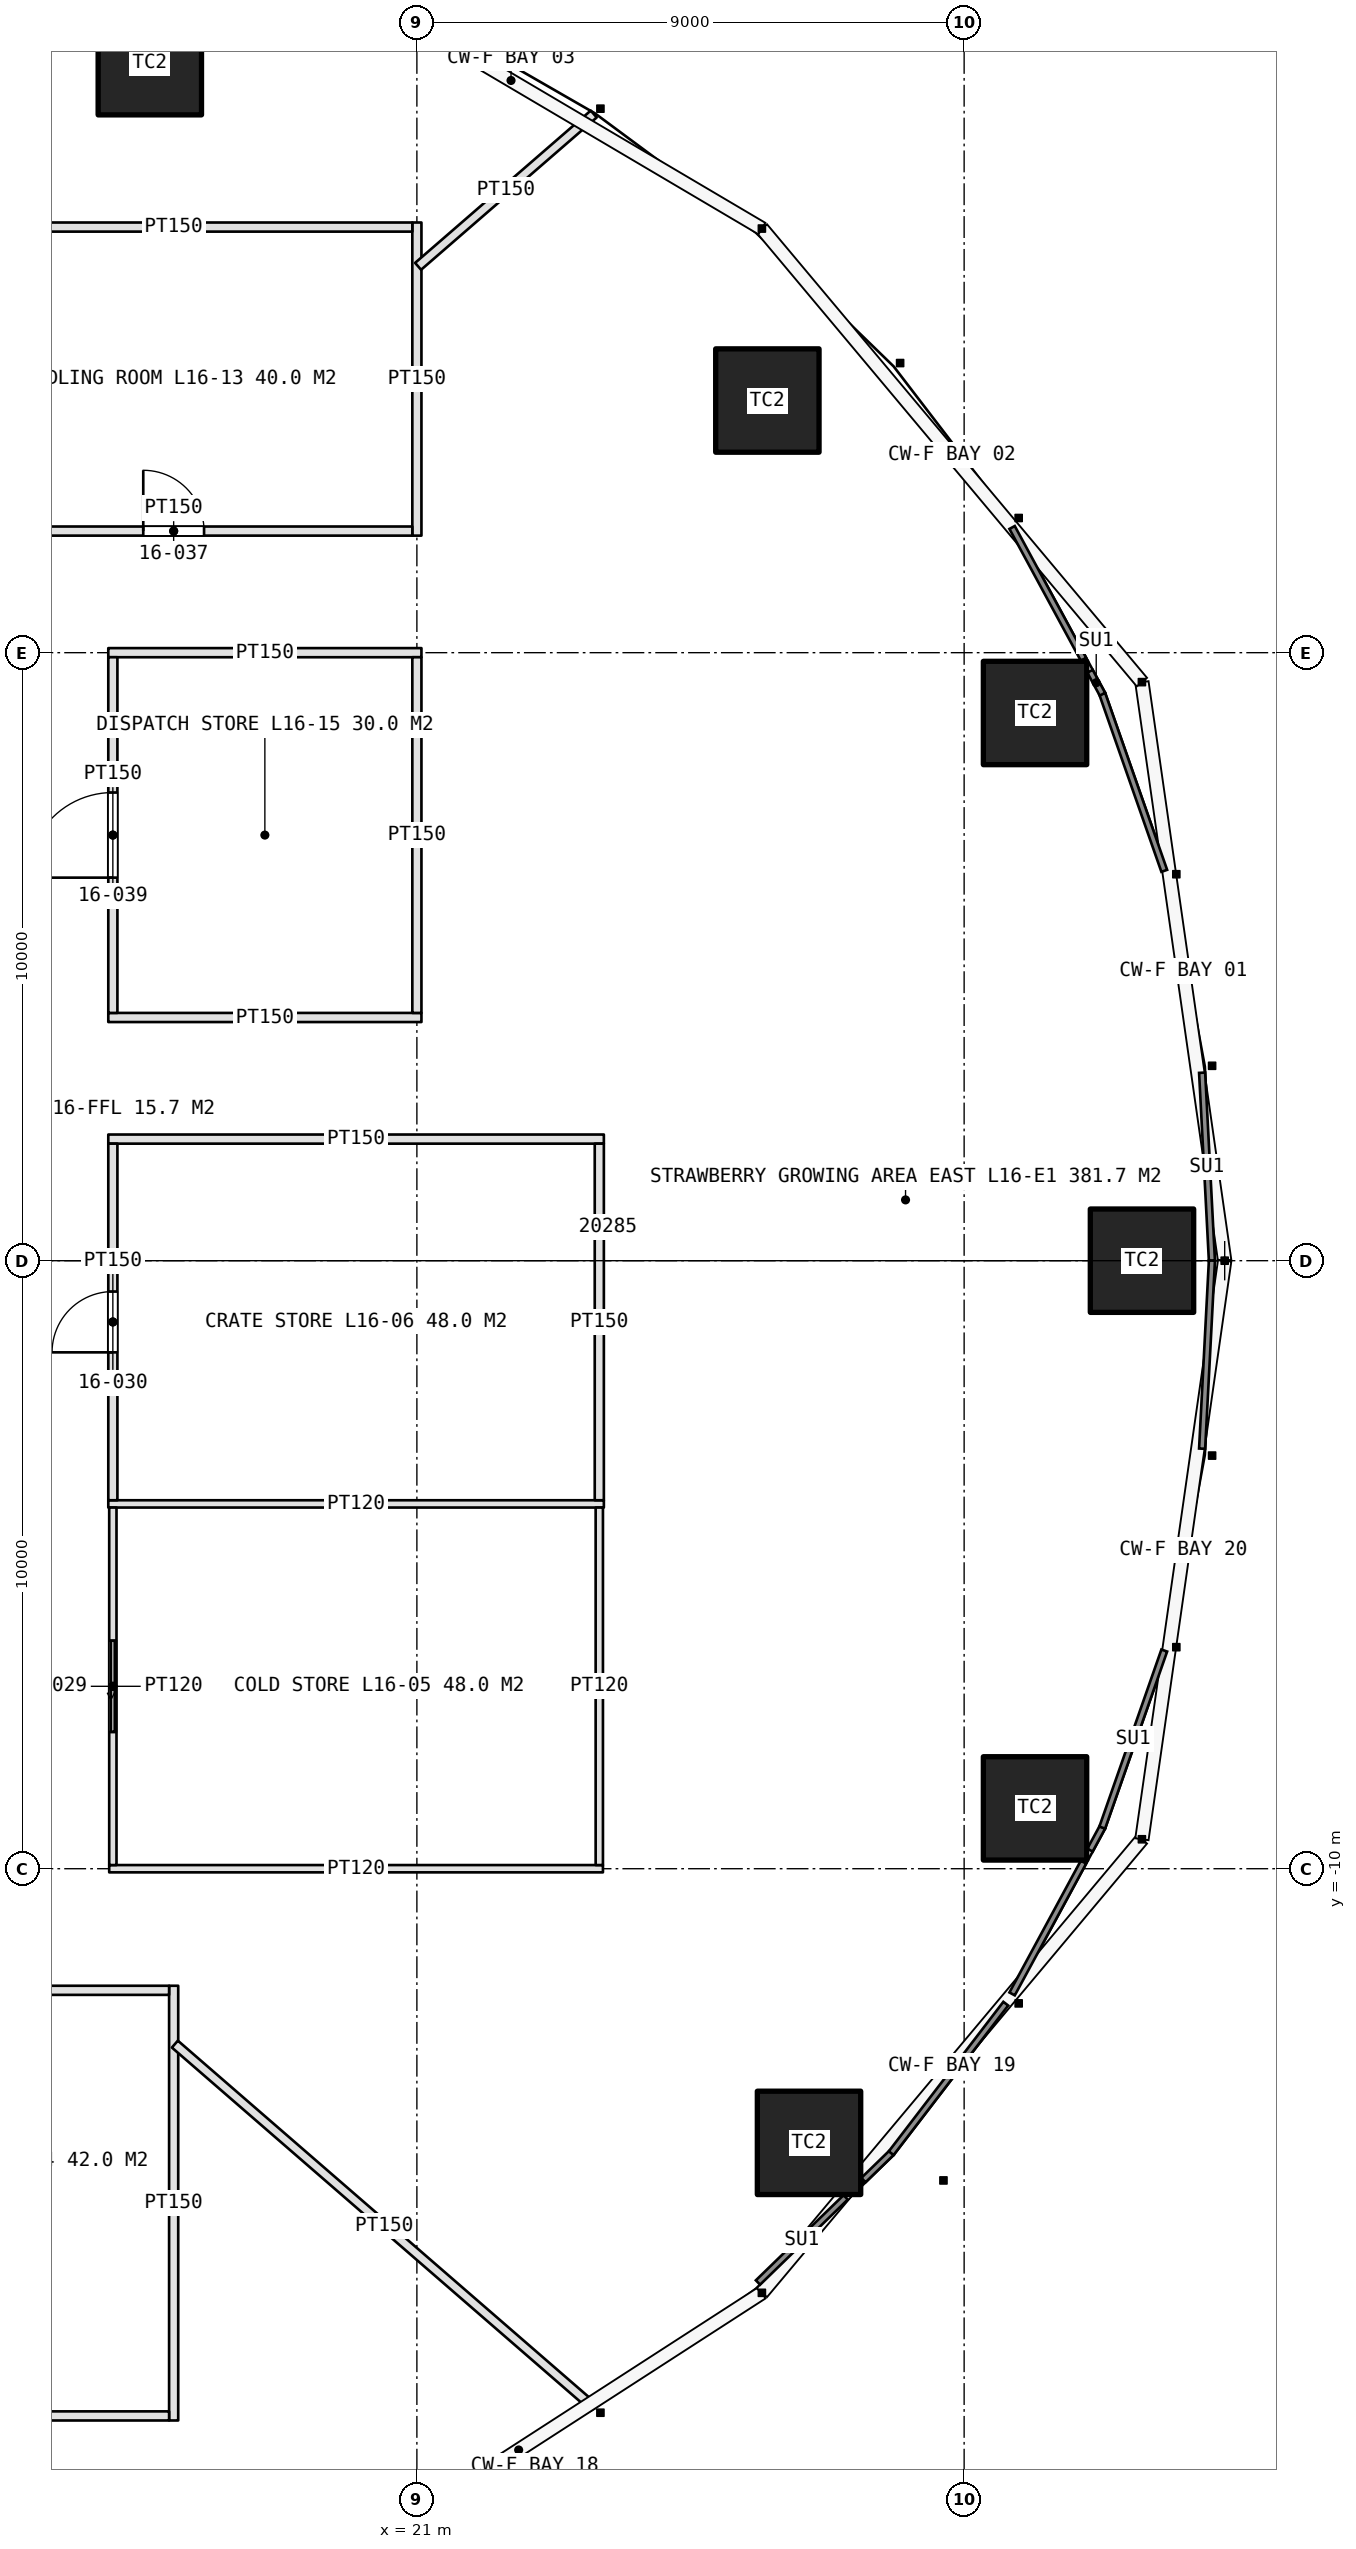
"""IFC4 building model, lengths in metres.
Left out: names, types, materials, properties, quantities, classifications, styles, units other than length and angle.
Written with IfcOpenShell. Run it as: python <this file> out.ifc"""

import sys

from ifc_helpers import new_model, si_unit, direction, frame, frame_2d, origin, origin_2d, place, context, subcontext, project, spatial, rectangle, extrude, element, fill, save


model = new_model("IFC4")
c1 = context("Model", 3, precision=1e-05, world=origin(), true_north=direction((0.0, 1.0)))
c2 = subcontext(c1, "Body", "Model", "MODEL_VIEW")
j1 = project(units=[si_unit("LENGTHUNIT", "METRE"), si_unit("PLANEANGLEUNIT", "RADIAN")], contexts=[c1])
p1 = place(None, origin())
s1 = spatial("IfcSite", under=j1, at=p1, CompositionType="ELEMENT")
p2 = place(p1, origin())
s2 = spatial("IfcBuilding", under=s1, at=p2, CompositionType="ELEMENT")
p3 = place(p2, frame((0.0, 0.0, 80.0)))
s3 = spatial("IfcBuildingStorey", under=s2, at=p3, CompositionType="ELEMENT", Elevation=80.0)
for number, where, z_axis, x_axis in (
    (1, (32.925, 0.0, 0.0), (0.0, 0.0, 1.0), (1.0, 0.0, 0.0)),
    (2, (31.166, 9.008, 0.0), (0.0, 0.0, 1.0), (1.0, 0.0, 0.0)),
    (3, (26.764, 14.147, 0.0), (0.0, 0.0, 1.0), (1.0, 0.0, 0.0)),
    (4, (16.608, 19.695, 0.0), (0.0, 0.0, 1.0), (1.0, 0.0, 0.0)),
    (5, (27.449, -14.509, 0.0), (0.0, 0.0, 1.0), (1.0, 0.0, 0.0)),
    (6, (31.166, -9.008, 0.0), (0.0, 0.0, 1.0), (1.0, 0.0, 0.0)),
):
    element("IfcColumn", number, at=place(p3, frame(where, z_axis=z_axis, x_axis=x_axis)), inside=s3, PredefinedType="COLUMN", context=c2, shape_type="SweptSolid", body=[
        extrude(rectangle(XDim=1.7, YDim=1.7, at=origin_2d()), origin(), (0.0, 0.0, 1.0), 5.0),
    ])
p4 = place(p3, frame((17.0, -11.925, 0.0), z_axis=(0.0, 0.0, 1.0), x_axis=(0.0, -1.0, 0.0)))
e7 = element("IfcWall", 7, at=p4, inside=s3, PredefinedType="PARTITIONING", context=c2, shape_type="SweptSolid", body=[
    extrude(rectangle(XDim=7.15, YDim=0.15, at=frame_2d((3.575, 0.0))), origin(), (0.0, 0.0, 1.0), 3.6),
])
p5 = place(p3, frame((11.075, -12.0, 0.0), z_axis=(0.0, 0.0, 1.0), x_axis=(1.0, 0.0, 0.0)))
e8 = element("IfcWall", 8, at=p5, inside=s3, PredefinedType="PARTITIONING", context=c2, shape_type="SweptSolid", body=[
    extrude(rectangle(XDim=5.85, YDim=0.15, at=frame_2d((2.925, 0.0))), origin(), (0.0, 0.0, 1.0), 3.6),
])
p6 = place(p5, frame((2.225, 0.0, 0.0)))
e9 = element("IfcOpeningElement", 9, at=p6, cuts=e8, PredefinedType="OPENING", context=c2, shape_type="SweptSolid", body=[
    extrude(rectangle(XDim=1.4, YDim=2.4, at=frame_2d((0.7, 1.2))), frame((0.0, 0.085, 0.0), z_axis=(0.0, -1.0, 0.0), x_axis=(1.0, 0.0, 0.0)), (0.0, 0.0, 1.0), 0.17),
])
p7 = place(p3, frame((11.075, -19.0, 0.0), z_axis=(0.0, 0.0, 1.0), x_axis=(1.0, 0.0, 0.0)))
e10 = element("IfcWall", 10, at=p7, inside=s3, PredefinedType="PARTITIONING", context=c2, shape_type="SweptSolid", body=[
    extrude(rectangle(XDim=5.85, YDim=0.15, at=frame_2d((2.925, 0.0))), origin(), (0.0, 0.0, 1.0), 3.6),
])
p8 = place(p3, frame((15.94, -10.0, 0.0), z_axis=(0.0, 0.0, 1.0), x_axis=(1.0, 0.0, 0.0)))
e11 = element("IfcWall", 11, at=p8, inside=s3, PredefinedType="PARTITIONING", context=c2, shape_type="SweptSolid", body=[
    extrude(rectangle(XDim=8.12, YDim=0.12, at=frame_2d((4.06, 0.0))), origin(), (0.0, 0.0, 1.0), 3.6),
])
p9 = place(p3, frame((15.925, -4.0, 0.0), z_axis=(0.0, 0.0, 1.0), x_axis=(1.0, 0.0, 0.0)))
e12 = element("IfcWall", 12, at=p9, inside=s3, PredefinedType="PARTITIONING", context=c2, shape_type="SweptSolid", body=[
    extrude(rectangle(XDim=8.15, YDim=0.12, at=frame_2d((4.075, 0.0))), origin(), (0.0, 0.0, 1.0), 3.6),
])
p10 = place(p3, frame((15.925, 2.0, 0.0), z_axis=(0.0, 0.0, 1.0), x_axis=(1.0, 0.0, 0.0)))
e13 = element("IfcWall", 13, at=p10, inside=s3, PredefinedType="PARTITIONING", context=c2, shape_type="SweptSolid", body=[
    extrude(rectangle(XDim=8.15, YDim=0.15, at=frame_2d((4.075, 0.0))), origin(), (0.0, 0.0, 1.0), 3.6),
])
p11 = place(p3, frame((16.0, -9.94, 0.0), z_axis=(0.0, 0.0, 1.0), x_axis=(0.0, 1.0, 0.0)))
e14 = element("IfcWall", 14, at=p11, inside=s3, PredefinedType="PARTITIONING", context=c2, shape_type="SweptSolid", body=[
    extrude(rectangle(XDim=5.88, YDim=0.12, at=frame_2d((2.94, 0.0))), origin(), (0.0, 0.0, 1.0), 3.6),
])
p12 = place(p11, frame((2.19, 0.0, 0.0)))
e15 = element("IfcOpeningElement", 15, at=p12, cuts=e14, PredefinedType="OPENING", context=c2, shape_type="SweptSolid", body=[
    extrude(rectangle(XDim=1.5, YDim=2.5, at=frame_2d((0.75, 1.25))), frame((0.0, 0.07, 0.0), z_axis=(0.0, -1.0, 0.0), x_axis=(1.0, 0.0, 0.0)), (0.0, 0.0, 1.0), 0.14),
])
p13 = place(p3, frame((24.0, -9.94, 0.0), z_axis=(0.0, 0.0, 1.0), x_axis=(0.0, 1.0, 0.0)))
e16 = element("IfcWall", 16, at=p13, inside=s3, PredefinedType="PARTITIONING", context=c2, shape_type="SweptSolid", body=[
    extrude(rectangle(XDim=5.88, YDim=0.12, at=frame_2d((2.94, 0.0))), origin(), (0.0, 0.0, 1.0), 3.6),
])
p14 = place(p3, frame((16.0, -3.94, 0.0), z_axis=(0.0, 0.0, 1.0), x_axis=(0.0, 1.0, 0.0)))
e17 = element("IfcWall", 17, at=p14, inside=s3, PredefinedType="PARTITIONING", context=c2, shape_type="SweptSolid", body=[
    extrude(rectangle(XDim=5.865, YDim=0.15, at=frame_2d((2.933, 0.0))), origin(), (0.0, 0.0, 1.0), 3.6),
])
p15 = place(p14, frame((2.433, 0.0, 0.0)))
e18 = element("IfcOpeningElement", 18, at=p15, cuts=e17, PredefinedType="OPENING", context=c2, shape_type="SweptSolid", body=[
    extrude(rectangle(XDim=1.0, YDim=2.2, at=frame_2d((0.5, 1.1))), frame((0.0, 0.085, 0.0), z_axis=(0.0, -1.0, 0.0), x_axis=(1.0, 0.0, 0.0)), (0.0, 0.0, 1.0), 0.17),
])
p16 = place(p3, frame((24.0, -3.94, 0.0), z_axis=(0.0, 0.0, 1.0), x_axis=(0.0, 1.0, 0.0)))
e19 = element("IfcWall", 19, at=p16, inside=s3, PredefinedType="PARTITIONING", context=c2, shape_type="SweptSolid", body=[
    extrude(rectangle(XDim=5.865, YDim=0.15, at=frame_2d((2.933, 0.0))), origin(), (0.0, 0.0, 1.0), 3.6),
])
p17 = place(p3, frame((21.0, 11.925, 0.0), z_axis=(0.0, 0.0, 1.0), x_axis=(0.0, 1.0, 0.0)))
e20 = element("IfcWall", 20, at=p17, inside=s3, PredefinedType="PARTITIONING", context=c2, shape_type="SweptSolid", body=[
    extrude(rectangle(XDim=5.15, YDim=0.15, at=frame_2d((2.575, 0.0))), origin(), (0.0, 0.0, 1.0), 3.6),
])
p18 = place(p3, frame((13.075, 12.0, 0.0), z_axis=(0.0, 0.0, 1.0), x_axis=(1.0, 0.0, 0.0)))
e21 = element("IfcWall", 21, at=p18, inside=s3, PredefinedType="PARTITIONING", context=c2, shape_type="SweptSolid", body=[
    extrude(rectangle(XDim=7.85, YDim=0.15, at=frame_2d((3.925, 0.0))), origin(), (0.0, 0.0, 1.0), 3.6),
])
p19 = place(p18, frame((3.425, 0.0, 0.0)))
e22 = element("IfcOpeningElement", 22, at=p19, cuts=e21, PredefinedType="OPENING", context=c2, shape_type="SweptSolid", body=[
    extrude(rectangle(XDim=1.0, YDim=2.2, at=frame_2d((0.5, 1.1))), frame((0.0, 0.085, 0.0), z_axis=(0.0, -1.0, 0.0), x_axis=(1.0, 0.0, 0.0)), (0.0, 0.0, 1.0), 0.17),
])
p20 = place(p3, frame((13.075, 17.0, 0.0), z_axis=(0.0, 0.0, 1.0), x_axis=(1.0, 0.0, 0.0)))
e23 = element("IfcWall", 23, at=p20, inside=s3, PredefinedType="PARTITIONING", context=c2, shape_type="SweptSolid", body=[
    extrude(rectangle(XDim=7.85, YDim=0.15, at=frame_2d((3.925, 0.0))), origin(), (0.0, 0.0, 1.0), 3.6),
])
for number, where, z_axis, x_axis in (
    (24, (15.925, 4.0, 0.0), (0.0, 0.0, 1.0), (1.0, 0.0, 0.0)),
    (25, (15.925, 10.0, 0.0), (0.0, 0.0, 1.0), (1.0, 0.0, 0.0)),
):
    element("IfcWall", number, at=place(p3, frame(where, z_axis=z_axis, x_axis=x_axis)), inside=s3, PredefinedType="PARTITIONING", context=c2, shape_type="SweptSolid", body=[
        extrude(rectangle(XDim=5.15, YDim=0.15, at=frame_2d((2.575, 0.0))), origin(), (0.0, 0.0, 1.0), 3.6),
    ])
p21 = place(p3, frame((16.0, 4.075, 0.0), z_axis=(0.0, 0.0, 1.0), x_axis=(0.0, 1.0, 0.0)))
e26 = element("IfcWall", 26, at=p21, inside=s3, PredefinedType="PARTITIONING", context=c2, shape_type="SweptSolid", body=[
    extrude(rectangle(XDim=5.85, YDim=0.15, at=frame_2d((2.925, 0.0))), origin(), (0.0, 0.0, 1.0), 3.6),
])
p22 = place(p21, frame((2.225, 0.0, 0.0)))
e27 = element("IfcOpeningElement", 27, at=p22, cuts=e26, PredefinedType="OPENING", context=c2, shape_type="SweptSolid", body=[
    extrude(rectangle(XDim=1.4, YDim=2.4, at=frame_2d((0.7, 1.2))), frame((0.0, 0.085, 0.0), z_axis=(0.0, -1.0, 0.0), x_axis=(1.0, 0.0, 0.0)), (0.0, 0.0, 1.0), 0.17),
])
p23 = place(p3, frame((21.0, 4.075, 0.0), z_axis=(0.0, 0.0, 1.0), x_axis=(0.0, 1.0, 0.0)))
e28 = element("IfcWall", 28, at=p23, inside=s3, PredefinedType="PARTITIONING", context=c2, shape_type="SweptSolid", body=[
    extrude(rectangle(XDim=5.85, YDim=0.15, at=frame_2d((2.925, 0.0))), origin(), (0.0, 0.0, 1.0), 3.6),
])
p24 = place(p3, frame((17.02, -12.885, 0.0), z_axis=(0.0, 0.0, 1.0), x_axis=(0.755439011433, -0.655218971035, 0.0)))
e29 = element("IfcWall", 29, at=p24, inside=s3, PredefinedType="PARTITIONING", context=c2, shape_type="SweptSolid", body=[
    extrude(rectangle(XDim=9.118, YDim=0.15, at=frame_2d((4.559, 0.0))), origin(), (0.0, 0.0, 1.0), 3.6),
])
p25 = place(p3, frame((21.02, 16.354, 0.0), z_axis=(0.0, 0.0, 1.0), x_axis=(0.755425653008, 0.655234372402, 0.0)))
e30 = element("IfcWall", 30, at=p25, inside=s3, PredefinedType="PARTITIONING", context=c2, shape_type="SweptSolid", body=[
    extrude(rectangle(XDim=3.823, YDim=0.15, at=frame_2d((1.912, 0.0))), origin(), (0.0, 0.0, 1.0), 3.6),
])
p26 = place(p12, origin())
e31 = element("IfcDoor", 31, at=p26, inside=s3, OperationType="SLIDING_TO_LEFT", PredefinedType="DOOR", context=c2, shape_type="SweptSolid", body=[
    extrude(rectangle(XDim=1.5, YDim=2.5, at=frame_2d((0.75, 1.25))), frame((0.0, 0.025, 0.0), z_axis=(0.0, -1.0, 0.0), x_axis=(1.0, 0.0, 0.0)), (0.0, 0.0, 1.0), 0.05),
])
fill(e15, e31)
p27 = place(p15, origin())
e32 = element("IfcDoor", 32, at=p27, inside=s3, OperationType="SINGLE_SWING_LEFT", PredefinedType="DOOR", context=c2, shape_type="SweptSolid", body=[
    extrude(rectangle(XDim=1.0, YDim=2.2, at=frame_2d((0.5, 1.1))), frame((0.0, 0.025, 0.0), z_axis=(0.0, -1.0, 0.0), x_axis=(1.0, 0.0, 0.0)), (0.0, 0.0, 1.0), 0.05),
])
fill(e18, e32)
p28 = place(p19, origin())
e33 = element("IfcDoor", 33, at=p28, inside=s3, OperationType="SINGLE_SWING_LEFT", PredefinedType="DOOR", context=c2, shape_type="SweptSolid", body=[
    extrude(rectangle(XDim=1.0, YDim=2.2, at=frame_2d((0.5, 1.1))), frame((0.0, 0.025, 0.0), z_axis=(0.0, -1.0, 0.0), x_axis=(1.0, 0.0, 0.0)), (0.0, 0.0, 1.0), 0.05),
])
fill(e22, e33)
p29 = place(p22, origin())
e34 = element("IfcDoor", 34, at=p29, inside=s3, OperationType="DOUBLE_DOOR_DOUBLE_SWING", PredefinedType="DOOR", context=c2, shape_type="SweptSolid", body=[
    extrude(rectangle(XDim=1.4, YDim=2.4, at=frame_2d((0.7, 1.2))), frame((0.0, 0.025, 0.0), z_axis=(0.0, -1.0, 0.0), x_axis=(1.0, 0.0, 0.0)), (0.0, 0.0, 1.0), 0.05),
])
fill(e27, e34)
save(model, sys.argv[1])
